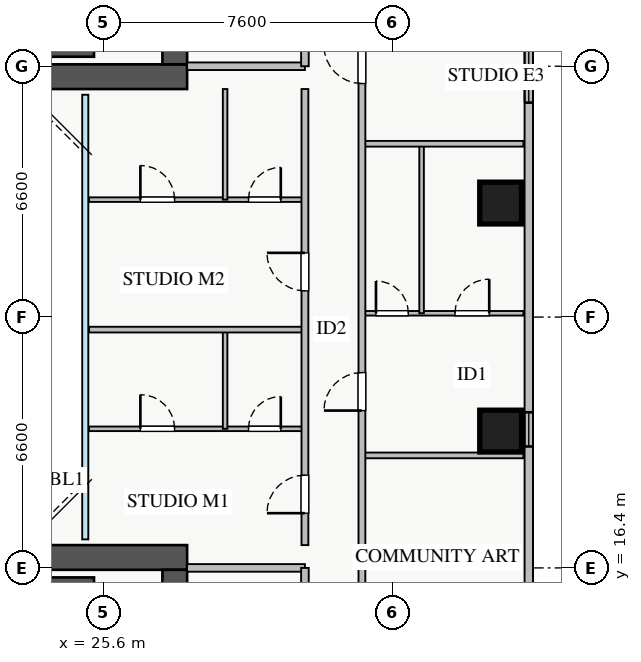
"""IFC4 building model, lengths in metres.
Left out: names, types, materials, properties, quantities, classifications, styles, units other than length and angle.
Written with IfcOpenShell. Run it as: python <this file> out.ifc"""

import sys

from ifc_helpers import new_model, si_unit, direction, frame, frame_2d, origin, origin_2d, place, context, subcontext, project, spatial, rectangle, extrude, source, transform, mapped, element, fill, save


model = new_model("IFC4")
c1 = context("Model", 3, precision=1e-05, world=origin(), true_north=direction((0.0, 1.0)))
c2 = subcontext(c1, "Body", "Model", "MODEL_VIEW")
j1 = project(units=[si_unit("LENGTHUNIT", "METRE"), si_unit("PLANEANGLEUNIT", "RADIAN")], contexts=[c1])
p1 = place(None, origin())
s1 = spatial("IfcSite", under=j1, at=p1, CompositionType="ELEMENT")
p2 = place(p1, origin())
s2 = spatial("IfcBuilding", under=s1, at=p2, CompositionType="ELEMENT")
p3 = place(p2, frame((0.0, 0.0, 97.0)))
s3 = spatial("IfcBuildingStorey", under=s2, at=p3, CompositionType="ELEMENT", Elevation=97.0)
for number, where, z_axis, x_axis in (
    (1, (18.2, 29.95, 0.0), (0.0, 0.0, 1.0), (1.0, 0.0, 0.0)),
    (2, (18.2, 16.05, 0.0), (0.0, 0.0, 1.0), (1.0, 0.0, 0.0)),
):
    element("IfcWall", number, at=place(p3, frame(where, z_axis=z_axis, x_axis=x_axis)), inside=s3, PredefinedType="SHEAR", context=c2, shape_type="SweptSolid", body=[
        extrude(rectangle(XDim=7.15, YDim=0.2, at=frame_2d((3.575, 0.0))), origin(), (0.0, 0.0, 1.0), 3.25),
    ])
p4 = place(p3, frame((10.2, 29.325, 0.0), z_axis=(0.0, 0.0, 1.0), x_axis=(1.0, 0.0, 0.0)))
e3 = element("IfcWall", 3, at=p4, inside=s3, PredefinedType="SHEAR", context=c2, shape_type="SweptSolid", body=[
    extrude(rectangle(XDim=17.6, YDim=0.65, at=frame_2d((8.8, 0.0))), origin(), (0.0, 0.0, 1.0), 3.25),
])
p5 = place(p3, frame((27.475, 29.65, 0.0), z_axis=(0.0, 0.0, 1.0), x_axis=(0.0, 1.0, 0.0)))
e4 = element("IfcWall", 4, at=p5, inside=s3, PredefinedType="SHEAR", context=c2, shape_type="SweptSolid", body=[
    extrude(rectangle(XDim=5.9, YDim=0.65, at=frame_2d((2.95, 0.0))), origin(), (0.0, 0.0, 1.0), 3.25),
])
p6 = place(p5, frame((1.1, 0.0, 0.0)))
e5 = element("IfcOpeningElement", 5, at=p6, cuts=e4, PredefinedType="OPENING", context=c2, shape_type="SweptSolid", body=[
    extrude(rectangle(XDim=1.3, YDim=2.05, at=frame_2d((0.65, 1.025))), frame((0.0, 0.335, 0.0), z_axis=(0.0, -1.0, 0.0), x_axis=(1.0, 0.0, 0.0)), (0.0, 0.0, 1.0), 0.67),
])
p7 = place(p3, frame((10.2, 16.675, 0.0), z_axis=(0.0, 0.0, 1.0), x_axis=(1.0, 0.0, 0.0)))
e6 = element("IfcWall", 6, at=p7, inside=s3, PredefinedType="SHEAR", context=c2, shape_type="SweptSolid", body=[
    extrude(rectangle(XDim=17.6, YDim=0.65, at=frame_2d((8.8, 0.0))), origin(), (0.0, 0.0, 1.0), 3.25),
])
p8 = place(p3, frame((27.475, 10.45, 0.0), z_axis=(0.0, 0.0, 1.0), x_axis=(0.0, 1.0, 0.0)))
e7 = element("IfcWall", 7, at=p8, inside=s3, PredefinedType="SHEAR", context=c2, shape_type="SweptSolid", body=[
    extrude(rectangle(XDim=5.9, YDim=0.65, at=frame_2d((2.95, 0.0))), origin(), (0.0, 0.0, 1.0), 3.25),
])
p9 = place(p8, frame((2.1, 0.0, 0.0)))
e8 = element("IfcOpeningElement", 8, at=p9, cuts=e7, PredefinedType="OPENING", context=c2, shape_type="SweptSolid", body=[
    extrude(rectangle(XDim=1.3, YDim=2.05, at=frame_2d((0.65, 1.025))), frame((0.0, 0.335, 0.0), z_axis=(0.0, -1.0, 0.0), x_axis=(1.0, 0.0, 0.0)), (0.0, 0.0, 1.0), 0.67),
])
m1 = source(origin(), c2, "Body", "SweptSolid", [
    extrude(rectangle(XDim=1.1, YDim=1.1, at=origin_2d()), origin(), (0.0, 0.0, 1.0), 3.25),
])
for number, where, z_axis, x_axis in (
    (9, (36.05, 20.0, 0.0), (0.0, 0.0, 1.0), (1.0, 0.0, 0.0)),
    (10, (36.05, 26.0, 0.0), (0.0, 0.0, 1.0), (1.0, 0.0, 0.0)),
):
    element("IfcColumn", number, at=place(p3, frame(where, z_axis=z_axis, x_axis=x_axis)), inside=s3, PredefinedType="COLUMN", context=c2, shape_type="MappedRepresentation", body=[
        mapped(m1, transform((0.0, 0.0, 0.0), x_axis=(1.0, 0.0, 0.0), y_axis=(0.0, 1.0, 0.0), z_axis=(0.0, 0.0, 1.0), scale=1.0)),
    ])
p10 = place(p3, frame((36.79, 10.55, 0.0), z_axis=(0.0, 0.0, 1.0), x_axis=(0.0, 1.0, 0.0)))
e11 = element("IfcWall", 11, at=p10, inside=s3, PredefinedType="STANDARD", context=c2, shape_type="SweptSolid", body=[
    extrude(rectangle(XDim=24.9, YDim=0.22, at=frame_2d((12.45, 0.0))), origin(), (0.0, 0.0, 1.0), 2.61),
])
p11 = place(p10, frame((1.912, 0.0, 0.9)))
e12 = element("IfcOpeningElement", 12, at=p11, cuts=e11, PredefinedType="OPENING", context=c2, shape_type="SweptSolid", body=[
    extrude(rectangle(XDim=2.4, YDim=1.48, at=frame_2d((1.2, 0.74))), frame((0.0, 0.12, 0.0), z_axis=(0.0, -1.0, 0.0), x_axis=(1.0, 0.0, 0.0)), (0.0, 0.0, 1.0), 0.24),
])
p12 = place(p10, frame((22.165, 0.0, 0.9)))
e13 = element("IfcOpeningElement", 13, at=p12, cuts=e11, PredefinedType="OPENING", context=c2, shape_type="SweptSolid", body=[
    extrude(rectangle(XDim=2.1, YDim=1.5, at=frame_2d((1.05, 0.75))), frame((0.0, 0.12, 0.0), z_axis=(0.0, -1.0, 0.0), x_axis=(1.0, 0.0, 0.0)), (0.0, 0.0, 1.0), 0.24),
])
p13 = place(p10, frame((18.093, 0.0, 0.9)))
e14 = element("IfcOpeningElement", 14, at=p13, cuts=e11, PredefinedType="OPENING", context=c2, shape_type="SweptSolid", body=[
    extrude(rectangle(XDim=2.4, YDim=1.5, at=frame_2d((1.2, 0.75))), frame((0.0, 0.12, 0.0), z_axis=(0.0, -1.0, 0.0), x_axis=(1.0, 0.0, 0.0)), (0.0, 0.0, 1.0), 0.24),
])
p14 = place(p10, frame((9.045, 0.0, 0.9)))
e15 = element("IfcOpeningElement", 15, at=p14, cuts=e11, PredefinedType="OPENING", context=c2, shape_type="SweptSolid", body=[
    extrude(rectangle(XDim=0.9, YDim=1.2, at=frame_2d((0.45, 0.6))), frame((0.0, 0.12, 0.0), z_axis=(0.0, -1.0, 0.0), x_axis=(1.0, 0.0, 0.0)), (0.0, 0.0, 1.0), 0.24),
])
p15 = place(p3, frame((27.8, 29.6, 0.0), z_axis=(0.0, 0.0, 1.0), x_axis=(1.0, 0.0, 0.0)))
e16 = element("IfcWall", 16, at=p15, inside=s3, PredefinedType="PARTITIONING", context=c2, shape_type="SweptSolid", body=[
    extrude(rectangle(XDim=3.1, YDim=0.2, at=frame_2d((1.55, 0.0))), origin(), (0.0, 0.0, 1.0), 3.07),
])
p16 = place(p3, frame((30.9, 29.6, 0.0), z_axis=(0.0, 0.0, 1.0), x_axis=(0.0, 1.0, 0.0)))
e17 = element("IfcWall", 17, at=p16, inside=s3, PredefinedType="PARTITIONING", context=c2, shape_type="SweptSolid", body=[
    extrude(rectangle(XDim=3.9, YDim=0.2, at=frame_2d((1.95, 0.0))), origin(), (0.0, 0.0, 1.0), 3.07),
])
p17 = place(p16, frame((1.4, 0.0, 0.0)))
e18 = element("IfcOpeningElement", 18, at=p17, cuts=e17, PredefinedType="OPENING", context=c2, shape_type="SweptSolid", body=[
    extrude(rectangle(XDim=1.1, YDim=2.05, at=frame_2d((0.55, 1.025))), frame((0.0, 0.11, 0.0), z_axis=(0.0, -1.0, 0.0), x_axis=(1.0, 0.0, 0.0)), (0.0, 0.0, 1.0), 0.22),
])
p18 = place(p3, frame((27.8, 16.4, 0.0), z_axis=(0.0, 0.0, 1.0), x_axis=(1.0, 0.0, 0.0)))
e19 = element("IfcWall", 19, at=p18, inside=s3, PredefinedType="PARTITIONING", context=c2, shape_type="SweptSolid", body=[
    extrude(rectangle(XDim=3.1, YDim=0.2, at=frame_2d((1.55, 0.0))), origin(), (0.0, 0.0, 1.0), 3.07),
])
p19 = place(p3, frame((30.9, 12.5, 0.0), z_axis=(0.0, 0.0, 1.0), x_axis=(0.0, 1.0, 0.0)))
e20 = element("IfcWall", 20, at=p19, inside=s3, PredefinedType="PARTITIONING", context=c2, shape_type="SweptSolid", body=[
    extrude(rectangle(XDim=3.9, YDim=0.2, at=frame_2d((1.95, 0.0))), origin(), (0.0, 0.0, 1.0), 3.07),
])
p20 = place(p19, frame((1.4, 0.0, 0.0)))
e21 = element("IfcOpeningElement", 21, at=p20, cuts=e20, PredefinedType="OPENING", context=c2, shape_type="SweptSolid", body=[
    extrude(rectangle(XDim=1.1, YDim=2.05, at=frame_2d((0.55, 1.025))), frame((0.0, 0.11, 0.0), z_axis=(0.0, -1.0, 0.0), x_axis=(1.0, 0.0, 0.0)), (0.0, 0.0, 1.0), 0.22),
])
p21 = place(p3, frame((32.4, 23.1, 0.0), z_axis=(0.0, 0.0, 1.0), x_axis=(1.0, 0.0, 0.0)))
e22 = element("IfcWall", 22, at=p21, inside=s3, PredefinedType="PLUMBINGWALL", context=c2, shape_type="SweptSolid", body=[
    extrude(rectangle(XDim=4.25, YDim=0.12, at=frame_2d((2.125, 0.0))), origin(), (0.0, 0.0, 1.0), 3.07),
])
p22 = place(p21, frame((0.37, 0.0, 0.0)))
e23 = element("IfcOpeningElement", 23, at=p22, cuts=e22, PredefinedType="OPENING", context=c2, shape_type="SweptSolid", body=[
    extrude(rectangle(XDim=0.85, YDim=2.05, at=frame_2d((0.425, 1.025))), frame((0.0, 0.07, 0.0), z_axis=(0.0, -1.0, 0.0), x_axis=(1.0, 0.0, 0.0)), (0.0, 0.0, 1.0), 0.14),
])
p23 = place(p21, frame((2.45, 0.0, 0.0)))
e24 = element("IfcOpeningElement", 24, at=p23, cuts=e22, PredefinedType="OPENING", context=c2, shape_type="SweptSolid", body=[
    extrude(rectangle(XDim=0.9, YDim=2.05, at=frame_2d((0.45, 1.025))), frame((0.0, 0.07, 0.0), z_axis=(0.0, -1.0, 0.0), x_axis=(1.0, 0.0, 0.0)), (0.0, 0.0, 1.0), 0.14),
])
p24 = place(p3, frame((33.97, 23.1, 0.0), z_axis=(0.0, 0.0, 1.0), x_axis=(0.0, 1.0, 0.0)))
e25 = element("IfcWall", 25, at=p24, inside=s3, PredefinedType="PLUMBINGWALL", context=c2, shape_type="SweptSolid", body=[
    extrude(rectangle(XDim=4.46, YDim=0.12, at=frame_2d((2.23, 0.0))), origin(), (0.0, 0.0, 1.0), 3.07),
])
for number, where, z_axis, x_axis in (
    (26, (32.4, 19.36, 0.0), (0.0, 0.0, 1.0), (1.0, 0.0, 0.0)),
    (27, (32.4, 27.56, 0.0), (0.0, 0.0, 1.0), (1.0, 0.0, 0.0)),
):
    element("IfcWall", number, at=place(p3, frame(where, z_axis=z_axis, x_axis=x_axis)), inside=s3, PredefinedType="PARTITIONING", context=c2, shape_type="SweptSolid", body=[
        extrude(rectangle(XDim=4.25, YDim=0.15, at=frame_2d((2.125, 0.0))), origin(), (0.0, 0.0, 1.0), 3.07),
    ])
p25 = place(p3, frame((32.4, 8.31, 0.0), z_axis=(0.0, 0.0, 1.0), x_axis=(0.0, 1.0, 0.0)))
e28 = element("IfcWall", 28, at=p25, inside=s3, PredefinedType="PARTITIONING", context=c2, shape_type="SweptSolid", body=[
    extrude(rectangle(XDim=29.13, YDim=0.18, at=frame_2d((14.565, 0.0))), origin(), (0.0, 0.0, 1.0), 3.07),
])
p26 = place(p25, frame((27.94, 0.0, 0.0)))
e29 = element("IfcOpeningElement", 29, at=p26, cuts=e28, PredefinedType="OPENING", context=c2, shape_type="SweptSolid", body=[
    extrude(rectangle(XDim=0.9, YDim=2.05, at=frame_2d((0.45, 1.025))), frame((0.0, 0.1, 0.0), z_axis=(0.0, -1.0, 0.0), x_axis=(1.0, 0.0, 0.0)), (0.0, 0.0, 1.0), 0.2),
])
p27 = place(p25, frame((0.415, 0.0, 0.0)))
e30 = element("IfcOpeningElement", 30, at=p27, cuts=e28, PredefinedType="OPENING", context=c2, shape_type="SweptSolid", body=[
    extrude(rectangle(XDim=0.9, YDim=2.05, at=frame_2d((0.45, 1.025))), frame((0.0, 0.1, 0.0), z_axis=(0.0, -1.0, 0.0), x_axis=(1.0, 0.0, 0.0)), (0.0, 0.0, 1.0), 0.2),
])
p28 = place(p25, frame((5.88, 0.0, 0.0)))
e31 = element("IfcOpeningElement", 31, at=p28, cuts=e28, PredefinedType="OPENING", context=c2, shape_type="SweptSolid", body=[
    extrude(rectangle(XDim=1.0, YDim=2.05, at=frame_2d((0.5, 1.025))), frame((0.0, 0.1, 0.0), z_axis=(0.0, -1.0, 0.0), x_axis=(1.0, 0.0, 0.0)), (0.0, 0.0, 1.0), 0.2),
])
p29 = place(p25, frame((12.23, 0.0, 0.0)))
e32 = element("IfcOpeningElement", 32, at=p29, cuts=e28, PredefinedType="OPENING", context=c2, shape_type="SweptSolid", body=[
    extrude(rectangle(XDim=1.0, YDim=2.05, at=frame_2d((0.5, 1.025))), frame((0.0, 0.1, 0.0), z_axis=(0.0, -1.0, 0.0), x_axis=(1.0, 0.0, 0.0)), (0.0, 0.0, 1.0), 0.2),
])
p30 = place(p25, frame((20.835, 0.0, 0.0)))
e33 = element("IfcOpeningElement", 33, at=p30, cuts=e28, PredefinedType="OPENING", context=c2, shape_type="SweptSolid", body=[
    extrude(rectangle(XDim=1.0, YDim=2.05, at=frame_2d((0.5, 1.025))), frame((0.0, 0.1, 0.0), z_axis=(0.0, -1.0, 0.0), x_axis=(1.0, 0.0, 0.0)), (0.0, 0.0, 1.0), 0.2),
])
p31 = place(p3, frame((25.22, 20.06, 0.0), z_axis=(0.0, 0.0, 1.0), x_axis=(1.0, 0.0, 0.0)))
e34 = element("IfcWall", 34, at=p31, inside=s3, PredefinedType="PLUMBINGWALL", context=c2, shape_type="SweptSolid", body=[
    extrude(rectangle(XDim=5.68, YDim=0.12, at=frame_2d((2.84, 0.0))), origin(), (0.0, 0.0, 1.0), 2.625),
])
p32 = place(p31, frame((1.35, 0.0, 0.0)))
e35 = element("IfcOpeningElement", 35, at=p32, cuts=e34, PredefinedType="OPENING", context=c2, shape_type="SweptSolid", body=[
    extrude(rectangle(XDim=0.9, YDim=2.05, at=frame_2d((0.45, 1.025))), frame((0.0, 0.07, 0.0), z_axis=(0.0, -1.0, 0.0), x_axis=(1.0, 0.0, 0.0)), (0.0, 0.0, 1.0), 0.14),
])
p33 = place(p31, frame((4.195, 0.0, 0.0)))
e36 = element("IfcOpeningElement", 36, at=p33, cuts=e34, PredefinedType="OPENING", context=c2, shape_type="SweptSolid", body=[
    extrude(rectangle(XDim=0.85, YDim=2.05, at=frame_2d((0.425, 1.025))), frame((0.0, 0.07, 0.0), z_axis=(0.0, -1.0, 0.0), x_axis=(1.0, 0.0, 0.0)), (0.0, 0.0, 1.0), 0.14),
])
p34 = place(p3, frame((28.8, 20.06, 0.0), z_axis=(0.0, 0.0, 1.0), x_axis=(0.0, 1.0, 0.0)))
e37 = element("IfcWall", 37, at=p34, inside=s3, PredefinedType="PLUMBINGWALL", context=c2, shape_type="SweptSolid", body=[
    extrude(rectangle(XDim=2.61, YDim=0.12, at=frame_2d((1.305, 0.0))), origin(), (0.0, 0.0, 1.0), 3.07),
])
p35 = place(p3, frame((25.22, 26.09, 0.0), z_axis=(0.0, 0.0, 1.0), x_axis=(1.0, 0.0, 0.0)))
e38 = element("IfcWall", 38, at=p35, inside=s3, PredefinedType="PLUMBINGWALL", context=c2, shape_type="SweptSolid", body=[
    extrude(rectangle(XDim=5.68, YDim=0.12, at=frame_2d((2.84, 0.0))), origin(), (0.0, 0.0, 1.0), 2.625),
])
p36 = place(p35, frame((1.35, 0.0, 0.0)))
e39 = element("IfcOpeningElement", 39, at=p36, cuts=e38, PredefinedType="OPENING", context=c2, shape_type="SweptSolid", body=[
    extrude(rectangle(XDim=0.9, YDim=2.05, at=frame_2d((0.45, 1.025))), frame((0.0, 0.07, 0.0), z_axis=(0.0, -1.0, 0.0), x_axis=(1.0, 0.0, 0.0)), (0.0, 0.0, 1.0), 0.14),
])
p37 = place(p35, frame((4.195, 0.0, 0.0)))
e40 = element("IfcOpeningElement", 40, at=p37, cuts=e38, PredefinedType="OPENING", context=c2, shape_type="SweptSolid", body=[
    extrude(rectangle(XDim=0.85, YDim=2.05, at=frame_2d((0.425, 1.025))), frame((0.0, 0.07, 0.0), z_axis=(0.0, -1.0, 0.0), x_axis=(1.0, 0.0, 0.0)), (0.0, 0.0, 1.0), 0.14),
])
p38 = place(p3, frame((28.8, 26.09, 0.0), z_axis=(0.0, 0.0, 1.0), x_axis=(0.0, 1.0, 0.0)))
e41 = element("IfcWall", 41, at=p38, inside=s3, PredefinedType="PLUMBINGWALL", context=c2, shape_type="SweptSolid", body=[
    extrude(rectangle(XDim=2.91, YDim=0.12, at=frame_2d((1.455, 0.0))), origin(), (0.0, 0.0, 1.0), 3.07),
])
p39 = place(p3, frame((25.22, 22.67, 0.0), z_axis=(0.0, 0.0, 1.0), x_axis=(1.0, 0.0, 0.0)))
e42 = element("IfcWall", 42, at=p39, inside=s3, PredefinedType="PARTITIONING", context=c2, shape_type="SweptSolid", body=[
    extrude(rectangle(XDim=5.68, YDim=0.15, at=frame_2d((2.84, 0.0))), origin(), (0.0, 0.0, 1.0), 3.07),
])
p40 = place(p3, frame((30.9, 17.0, 0.0), z_axis=(0.0, 0.0, 1.0), x_axis=(0.0, 1.0, 0.0)))
e43 = element("IfcWall", 43, at=p40, inside=s3, PredefinedType="PARTITIONING", context=c2, shape_type="SweptSolid", body=[
    extrude(rectangle(XDim=12.0, YDim=0.18, at=frame_2d((6.0, 0.0))), origin(), (0.0, 0.0, 1.0), 3.07),
])
p41 = place(p40, frame((0.84, 0.0, 0.0)))
e44 = element("IfcOpeningElement", 44, at=p41, cuts=e43, PredefinedType="OPENING", context=c2, shape_type="SweptSolid", body=[
    extrude(rectangle(XDim=1.0, YDim=2.05, at=frame_2d((0.5, 1.025))), frame((0.0, 0.1, 0.0), z_axis=(0.0, -1.0, 0.0), x_axis=(1.0, 0.0, 0.0)), (0.0, 0.0, 1.0), 0.2),
])
p42 = place(p40, frame((6.69, 0.0, 0.0)))
e45 = element("IfcOpeningElement", 45, at=p42, cuts=e43, PredefinedType="OPENING", context=c2, shape_type="SweptSolid", body=[
    extrude(rectangle(XDim=1.0, YDim=2.05, at=frame_2d((0.5, 1.025))), frame((0.0, 0.1, 0.0), z_axis=(0.0, -1.0, 0.0), x_axis=(1.0, 0.0, 0.0)), (0.0, 0.0, 1.0), 0.2),
])
m2 = source(origin(), c2, "Body", "SweptSolid", [
    extrude(rectangle(XDim=0.85, YDim=2.05, at=frame_2d((0.425, 1.025))), frame((0.0, 0.025, 0.0), z_axis=(0.0, -1.0, 0.0), x_axis=(1.0, 0.0, 0.0)), (0.0, 0.0, 1.0), 0.05),
])
p43 = place(p22, origin())
e46 = element("IfcDoor", 46, at=p43, inside=s3, OperationType="SINGLE_SWING_LEFT", PredefinedType="DOOR", context=c2, shape_type="MappedRepresentation", body=[
    mapped(m2, transform((0.0, 0.0, 0.0), x_axis=(1.0, 0.0, 0.0), y_axis=(0.0, 1.0, 0.0), z_axis=(0.0, 0.0, 1.0), scale=1.0)),
])
fill(e23, e46)
m3 = source(origin(), c2, "Body", "SweptSolid", [
    extrude(rectangle(XDim=0.9, YDim=2.05, at=frame_2d((0.45, 1.025))), frame((0.0, 0.025, 0.0), z_axis=(0.0, -1.0, 0.0), x_axis=(1.0, 0.0, 0.0)), (0.0, 0.0, 1.0), 0.05),
])
p44 = place(p23, origin())
e47 = element("IfcDoor", 47, at=p44, inside=s3, OperationType="SINGLE_SWING_RIGHT", PredefinedType="DOOR", context=c2, shape_type="MappedRepresentation", body=[
    mapped(m3, transform((0.0, 0.0, 0.0), x_axis=(1.0, 0.0, 0.0), y_axis=(0.0, 1.0, 0.0), z_axis=(0.0, 0.0, 1.0), scale=1.0)),
])
fill(e24, e47)
m4 = source(origin(), c2, "Body", "SweptSolid", [
    extrude(rectangle(XDim=1.0, YDim=2.05, at=frame_2d((0.5, 1.025))), frame((0.0, 0.025, 0.0), z_axis=(0.0, -1.0, 0.0), x_axis=(1.0, 0.0, 0.0)), (0.0, 0.0, 1.0), 0.05),
])
p45 = place(p29, origin())
e48 = element("IfcDoor", 48, at=p45, inside=s3, OperationType="SINGLE_SWING_LEFT", PredefinedType="DOOR", context=c2, shape_type="MappedRepresentation", body=[
    mapped(m4, transform((0.0, 0.0, 0.0), x_axis=(1.0, 0.0, 0.0), y_axis=(0.0, 1.0, 0.0), z_axis=(0.0, 0.0, 1.0), scale=1.0)),
])
fill(e32, e48)
p46 = place(p30, origin())
e49 = element("IfcDoor", 49, at=p46, inside=s3, OperationType="SINGLE_SWING_RIGHT", PredefinedType="DOOR", context=c2, shape_type="MappedRepresentation", body=[
    mapped(m4, transform((0.0, 0.0, 0.0), x_axis=(1.0, 0.0, 0.0), y_axis=(0.0, 1.0, 0.0), z_axis=(0.0, 0.0, 1.0), scale=1.0)),
])
fill(e33, e49)
p47 = place(p32, origin())
e50 = element("IfcDoor", 50, at=p47, inside=s3, OperationType="SINGLE_SWING_LEFT", PredefinedType="DOOR", context=c2, shape_type="MappedRepresentation", body=[
    mapped(m3, transform((0.0, 0.0, 0.0), x_axis=(1.0, 0.0, 0.0), y_axis=(0.0, 1.0, 0.0), z_axis=(0.0, 0.0, 1.0), scale=1.0)),
])
fill(e35, e50)
p48 = place(p33, origin())
e51 = element("IfcDoor", 51, at=p48, inside=s3, OperationType="SINGLE_SWING_RIGHT", PredefinedType="DOOR", context=c2, shape_type="MappedRepresentation", body=[
    mapped(m2, transform((0.0, 0.0, 0.0), x_axis=(1.0, 0.0, 0.0), y_axis=(0.0, 1.0, 0.0), z_axis=(0.0, 0.0, 1.0), scale=1.0)),
])
fill(e36, e51)
p49 = place(p36, origin())
e52 = element("IfcDoor", 52, at=p49, inside=s3, OperationType="SINGLE_SWING_LEFT", PredefinedType="DOOR", context=c2, shape_type="MappedRepresentation", body=[
    mapped(m3, transform((0.0, 0.0, 0.0), x_axis=(1.0, 0.0, 0.0), y_axis=(0.0, 1.0, 0.0), z_axis=(0.0, 0.0, 1.0), scale=1.0)),
])
fill(e39, e52)
p50 = place(p37, origin())
e53 = element("IfcDoor", 53, at=p50, inside=s3, OperationType="SINGLE_SWING_RIGHT", PredefinedType="DOOR", context=c2, shape_type="MappedRepresentation", body=[
    mapped(m2, transform((0.0, 0.0, 0.0), x_axis=(1.0, 0.0, 0.0), y_axis=(0.0, 1.0, 0.0), z_axis=(0.0, 0.0, 1.0), scale=1.0)),
])
fill(e40, e53)
p51 = place(p41, origin())
e54 = element("IfcDoor", 54, at=p51, inside=s3, OperationType="SINGLE_SWING_LEFT", PredefinedType="DOOR", context=c2, shape_type="MappedRepresentation", body=[
    mapped(m4, transform((0.0, 0.0, 0.0), x_axis=(1.0, 0.0, 0.0), y_axis=(0.0, 1.0, 0.0), z_axis=(0.0, 0.0, 1.0), scale=1.0)),
])
fill(e44, e54)
p52 = place(p42, origin())
e55 = element("IfcDoor", 55, at=p52, inside=s3, OperationType="SINGLE_SWING_RIGHT", PredefinedType="DOOR", context=c2, shape_type="MappedRepresentation", body=[
    mapped(m4, transform((0.0, 0.0, 0.0), x_axis=(1.0, 0.0, 0.0), y_axis=(0.0, 1.0, 0.0), z_axis=(0.0, 0.0, 1.0), scale=1.0)),
])
fill(e45, e55)
m5 = source(origin(), c2, "Body", "SweptSolid", [
    extrude(rectangle(XDim=2.4, YDim=1.5, at=frame_2d((1.2, 0.75))), frame((0.0, 0.03, 0.0), z_axis=(0.0, -1.0, 0.0), x_axis=(1.0, 0.0, 0.0)), (0.0, 0.0, 1.0), 0.06),
])
p53 = place(p13, origin())
e56 = element("IfcWindow", 56, at=p53, inside=s3, PartitioningType="TRIPLE_PANEL_VERTICAL", PredefinedType="WINDOW", context=c2, shape_type="MappedRepresentation", body=[
    mapped(m5, transform((0.0, 0.0, 0.0), x_axis=(1.0, 0.0, 0.0), y_axis=(0.0, 1.0, 0.0), z_axis=(0.0, 0.0, 1.0), scale=1.0)),
])
fill(e14, e56)
m6 = source(origin(), c2, "Body", "SweptSolid", [
    extrude(rectangle(XDim=0.9, YDim=1.2, at=frame_2d((0.45, 0.6))), frame((0.0, 0.03, 0.0), z_axis=(0.0, -1.0, 0.0), x_axis=(1.0, 0.0, 0.0)), (0.0, 0.0, 1.0), 0.06),
])
p54 = place(p14, origin())
e57 = element("IfcWindow", 57, at=p54, inside=s3, PartitioningType="SINGLE_PANEL", PredefinedType="WINDOW", context=c2, shape_type="MappedRepresentation", body=[
    mapped(m6, transform((0.0, 0.0, 0.0), x_axis=(1.0, 0.0, 0.0), y_axis=(0.0, 1.0, 0.0), z_axis=(0.0, 0.0, 1.0), scale=1.0)),
])
fill(e15, e57)
save(model, sys.argv[1])
